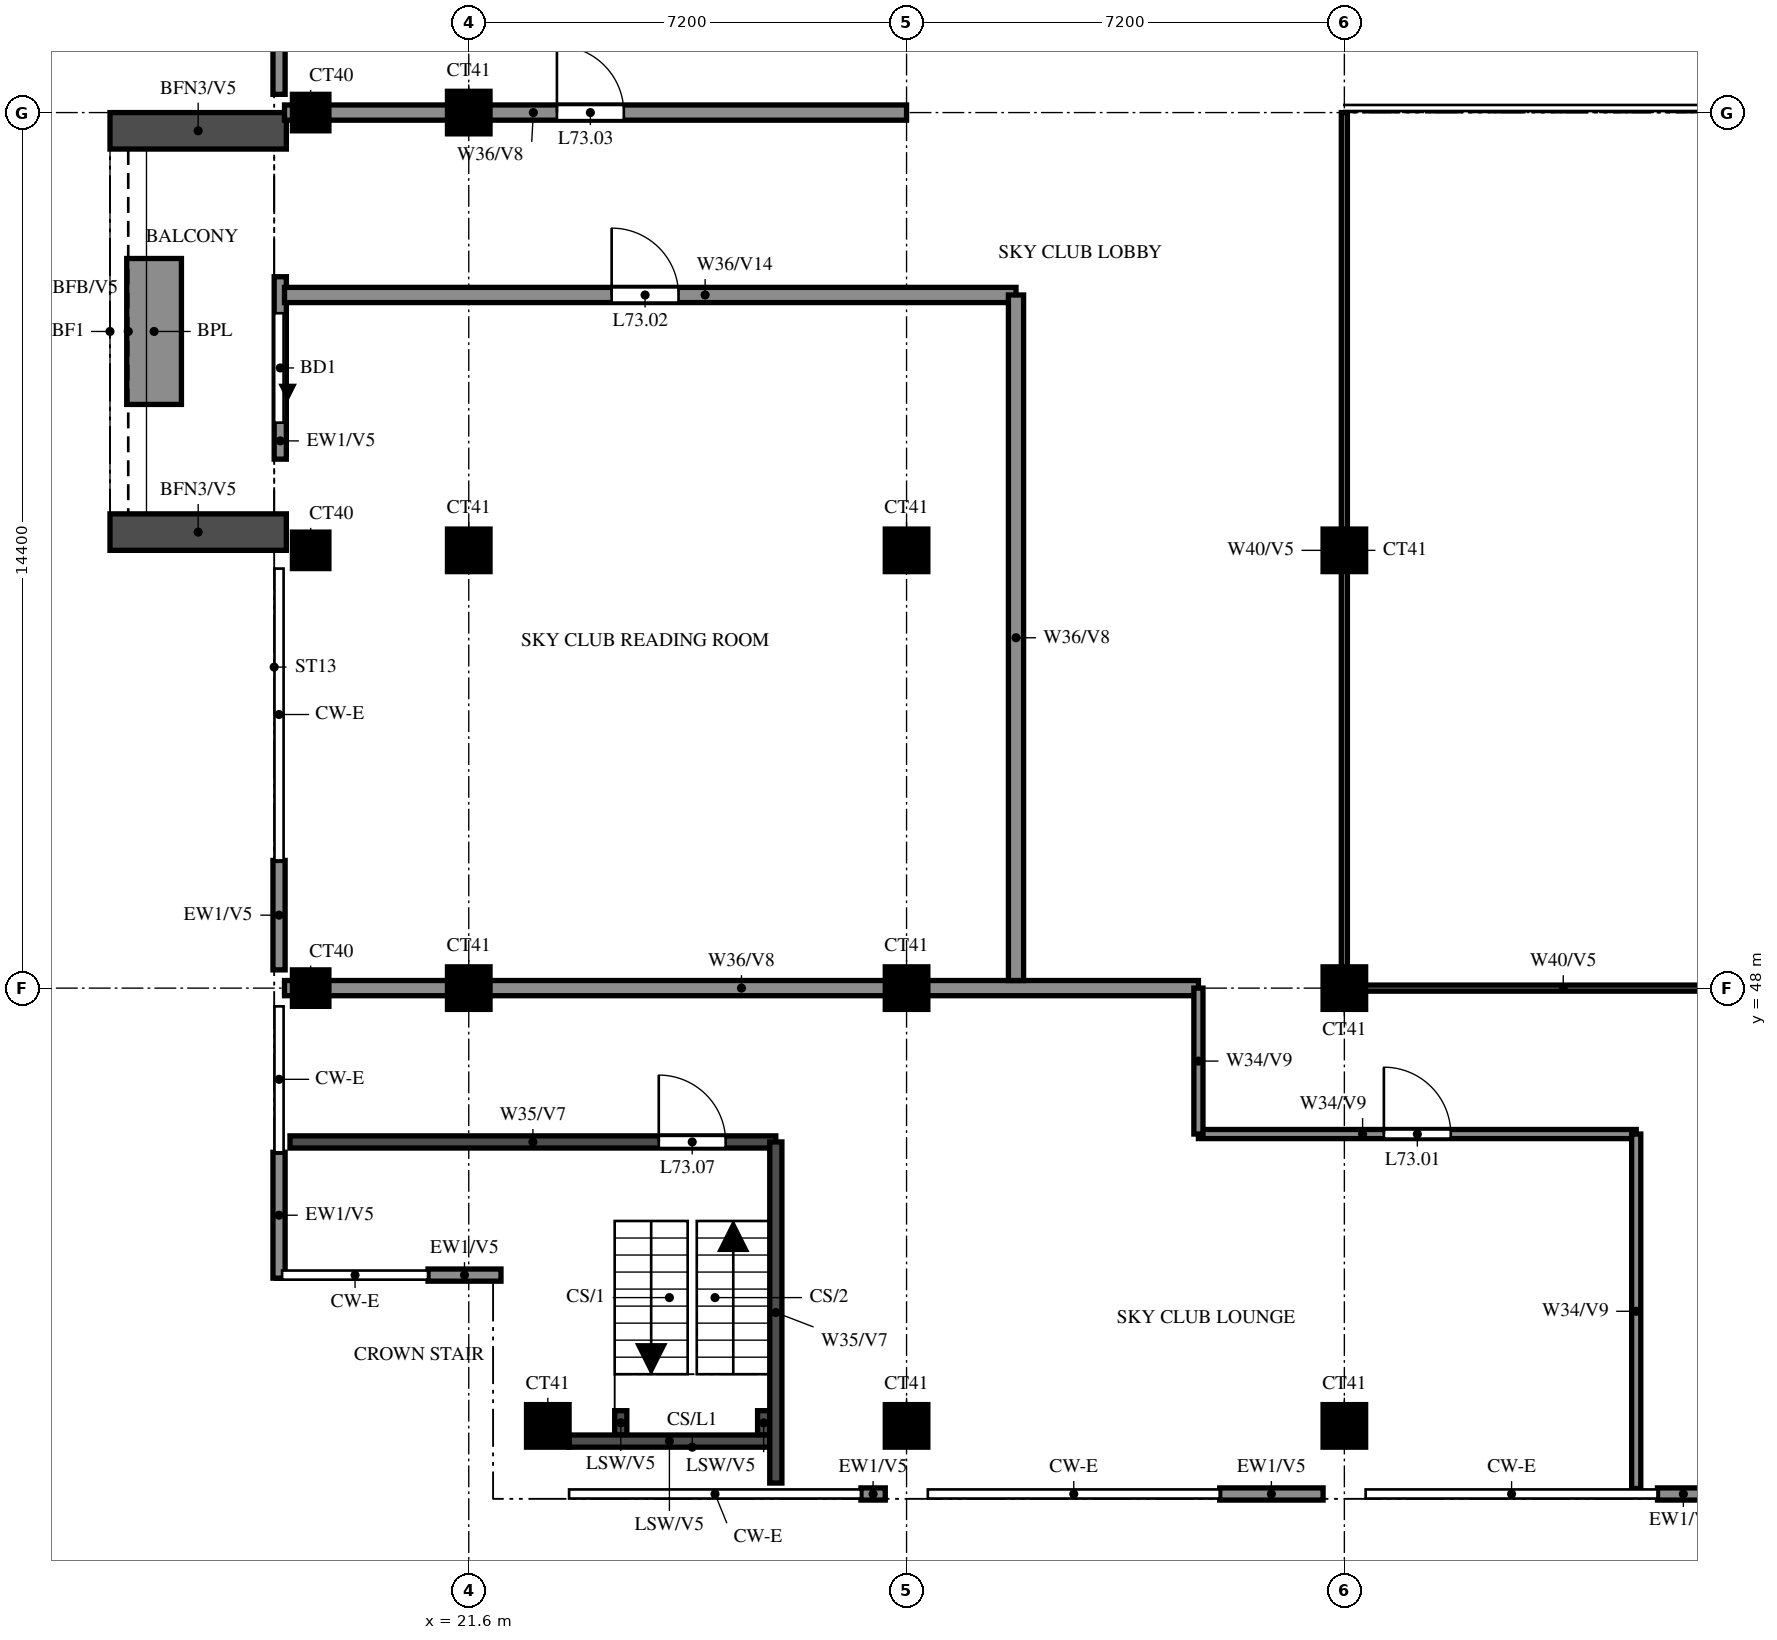
"""IFC4 building model, lengths in metres.
Left out: names, types, materials, properties, quantities, classifications, styles, units other than length and angle.
Written with IfcOpenShell. Run it as: python <this file> out.ifc"""

import sys

from ifc_helpers import new_model, si_unit, direction, frame, frame_2d, origin, origin_2d, place, context, subcontext, project, spatial, rectangle, extrude, source, transform, mapped, element, fill, save


model = new_model("IFC4")
c1 = context("Model", 3, precision=1e-05, world=origin(), true_north=direction((0.0, 1.0)))
c2 = subcontext(c1, "Body", "Model", "MODEL_VIEW")
j1 = project(units=[si_unit("LENGTHUNIT", "METRE"), si_unit("PLANEANGLEUNIT", "RADIAN")], contexts=[c1])
p1 = place(None, origin())
s1 = spatial("IfcSite", under=j1, at=p1, CompositionType="ELEMENT")
p2 = place(p1, origin())
s2 = spatial("IfcBuilding", under=s1, at=p2, CompositionType="ELEMENT")
p3 = place(p2, frame((0.0, 0.0, 271.0)))
s3 = spatial("IfcBuildingStorey", under=s2, at=p3, CompositionType="ELEMENT", Elevation=271.0)
m1 = source(origin(), c2, "Body", "SweptSolid", [
    extrude(rectangle(XDim=0.7, YDim=0.7, at=origin_2d()), origin(), (0.0, 0.0, 1.0), 3.15),
])
for number, where, z_axis, x_axis in (
    (1, (22.9, 40.8, 0.0), (0.0, 0.0, 1.0), (1.0, 0.0, 0.0)),
    (2, (28.8, 40.8, 0.0), (0.0, 0.0, 1.0), (1.0, 0.0, 0.0)),
    (3, (36.0, 40.8, 0.0), (0.0, 0.0, 1.0), (1.0, 0.0, 0.0)),
):
    element("IfcColumn", number, at=place(p3, frame(where, z_axis=z_axis, x_axis=x_axis)), inside=s3, PredefinedType="COLUMN", context=c2, shape_type="MappedRepresentation", body=[
        mapped(m1, transform((0.0, 0.0, 0.0))),
    ])
m2 = source(origin(), c2, "Body", "SweptSolid", [
    extrude(rectangle(XDim=0.6, YDim=0.6, at=origin_2d()), origin(), (0.0, 0.0, 1.0), 3.15),
])
p4 = place(p3, frame((19.0, 48.0, 0.0), z_axis=(0.0, 0.0, 1.0), x_axis=(1.0, 0.0, 0.0)))
e4 = element("IfcColumn", 4, at=p4, inside=s3, PredefinedType="COLUMN", context=c2, shape_type="MappedRepresentation", body=[
    mapped(m2, transform((0.0, 0.0, 0.0))),
])
for number, where, z_axis, x_axis in (
    (5, (21.6, 48.0, 0.0), (0.0, 0.0, 1.0), (1.0, 0.0, 0.0)),
    (6, (28.8, 48.0, 0.0), (0.0, 0.0, 1.0), (1.0, 0.0, 0.0)),
    (7, (36.0, 48.0, 0.0), (0.0, 0.0, 1.0), (1.0, 0.0, 0.0)),
):
    element("IfcColumn", number, at=place(p3, frame(where, z_axis=z_axis, x_axis=x_axis)), inside=s3, PredefinedType="COLUMN", context=c2, shape_type="MappedRepresentation", body=[
        mapped(m1, transform((0.0, 0.0, 0.0))),
    ])
p5 = place(p3, frame((19.0, 55.2, 0.0), z_axis=(0.0, 0.0, 1.0), x_axis=(1.0, 0.0, 0.0)))
e8 = element("IfcColumn", 8, at=p5, inside=s3, PredefinedType="COLUMN", context=c2, shape_type="MappedRepresentation", body=[
    mapped(m2, transform((0.0, 0.0, 0.0))),
])
for number, where, z_axis, x_axis in (
    (9, (21.6, 55.2, 0.0), (0.0, 0.0, 1.0), (1.0, 0.0, 0.0)),
    (10, (28.8, 55.2, 0.0), (0.0, 0.0, 1.0), (1.0, 0.0, 0.0)),
    (11, (36.0, 55.2, 0.0), (0.0, 0.0, 1.0), (1.0, 0.0, 0.0)),
):
    element("IfcColumn", number, at=place(p3, frame(where, z_axis=z_axis, x_axis=x_axis)), inside=s3, PredefinedType="COLUMN", context=c2, shape_type="MappedRepresentation", body=[
        mapped(m1, transform((0.0, 0.0, 0.0))),
    ])
p6 = place(p3, frame((19.0, 62.4, 0.0), z_axis=(0.0, 0.0, 1.0), x_axis=(1.0, 0.0, 0.0)))
e12 = element("IfcColumn", 12, at=p6, inside=s3, PredefinedType="COLUMN", context=c2, shape_type="MappedRepresentation", body=[
    mapped(m2, transform((0.0, 0.0, 0.0))),
])
p7 = place(p3, frame((21.6, 62.4, 0.0), z_axis=(0.0, 0.0, 1.0), x_axis=(1.0, 0.0, 0.0)))
e13 = element("IfcColumn", 13, at=p7, inside=s3, PredefinedType="COLUMN", context=c2, shape_type="MappedRepresentation", body=[
    mapped(m1, transform((0.0, 0.0, 0.0))),
])
p8 = place(p3, frame((18.5, 59.7, 0.0), z_axis=(0.0, 0.0, 1.0), x_axis=(0.0, -1.0, 0.0)))
e14 = element("IfcWall", 14, at=p8, inside=s3, PredefinedType="SOLIDWALL", context=c2, shape_type="SweptSolid", body=[
    extrude(rectangle(XDim=3.0, YDim=0.2, at=frame_2d((1.5, 0.0))), origin(), (0.0, 0.0, 1.0), 3.15),
])
p9 = place(p8, frame((0.6, 0.0, 0.0)))
e15 = element("IfcOpeningElement", 15, at=p9, cuts=e14, PredefinedType="OPENING", context=c2, shape_type="SweptSolid", body=[
    extrude(rectangle(XDim=1.8, YDim=2.4, at=frame_2d((0.9, 1.2))), frame((0.0, 0.11, 0.0), z_axis=(0.0, -1.0, 0.0), x_axis=(1.0, 0.0, 0.0)), (0.0, 0.0, 1.0), 0.22),
])
for number, where, z_axis, x_axis in (
    (16, (18.48, 64.5, 0.0), (0.0, 0.0, 1.0), (0.0, -1.0, 0.0)),
    (17, (18.48, 50.1, 0.0), (0.0, 0.0, 1.0), (0.0, -1.0, 0.0)),
):
    element("IfcWall", number, at=place(p3, frame(where, z_axis=z_axis, x_axis=x_axis)), inside=s3, PredefinedType="SOLIDWALL", context=c2, shape_type="SweptSolid", body=[
        extrude(rectangle(XDim=1.8, YDim=0.2, at=frame_2d((0.9, 0.0))), origin(), (0.0, 0.0, 1.0), 3.15),
    ])
p10 = place(p3, frame((18.48, 45.3, 0.0), z_axis=(0.0, 0.0, 1.0), x_axis=(0.0, -1.0, 0.0)))
e18 = element("IfcWall", 18, at=p10, inside=s3, PredefinedType="SOLIDWALL", context=c2, shape_type="SweptSolid", body=[
    extrude(rectangle(XDim=2.07, YDim=0.2, at=frame_2d((1.035, 0.0))), origin(), (0.0, 0.0, 1.0), 3.15),
])
p11 = place(p3, frame((20.93, 43.28, 0.0), z_axis=(0.0, 0.0, 1.0), x_axis=(1.0, 0.0, 0.0)))
e19 = element("IfcWall", 19, at=p11, inside=s3, PredefinedType="SOLIDWALL", context=c2, shape_type="SweptSolid", body=[
    extrude(rectangle(XDim=1.2, YDim=0.2, at=frame_2d((0.6, 0.0))), origin(), (0.0, 0.0, 1.0), 3.15),
])
p12 = place(p3, frame((28.05, 39.68, 0.0), z_axis=(0.0, 0.0, 1.0), x_axis=(1.0, 0.0, 0.0)))
e20 = element("IfcWall", 20, at=p12, inside=s3, PredefinedType="SOLIDWALL", context=c2, shape_type="SweptSolid", body=[
    extrude(rectangle(XDim=0.4, YDim=0.2, at=frame_2d((0.2, 0.0))), origin(), (0.0, 0.0, 1.0), 3.15),
])
p13 = place(p3, frame((33.95, 39.68, 0.0), z_axis=(0.0, 0.0, 1.0), x_axis=(1.0, 0.0, 0.0)))
e21 = element("IfcWall", 21, at=p13, inside=s3, PredefinedType="SOLIDWALL", context=c2, shape_type="SweptSolid", body=[
    extrude(rectangle(XDim=1.7, YDim=0.2, at=frame_2d((0.85, 0.0))), origin(), (0.0, 0.0, 1.0), 3.15),
])
p14 = place(p3, frame((41.15, 39.68, 0.0), z_axis=(0.0, 0.0, 1.0), x_axis=(1.0, 0.0, 0.0)))
e22 = element("IfcWall", 22, at=p14, inside=s3, PredefinedType="SOLIDWALL", context=c2, shape_type="SweptSolid", body=[
    extrude(rectangle(XDim=0.85, YDim=0.2, at=frame_2d((0.425, 0.0))), origin(), (0.0, 0.0, 1.0), 3.15),
])
for number, where, z_axis, x_axis in (
    (23, (18.6, 62.1, 0.0), (0.0, 0.0, 1.0), (-1.0, 0.0, 0.0)),
    (24, (18.6, 55.5, 0.0), (0.0, 0.0, 1.0), (-1.0, 0.0, 0.0)),
):
    element("IfcWall", number, at=place(p3, frame(where, z_axis=z_axis, x_axis=x_axis)), inside=s3, PredefinedType="SOLIDWALL", context=c2, shape_type="SweptSolid", body=[
        extrude(rectangle(XDim=2.9, YDim=0.6, at=frame_2d((1.45, 0.0))), origin(), (0.0, 0.0, 1.0), 2.901),
    ])
p15 = place(p3, frame((16.425, 60.0, 0.0), z_axis=(0.0, 0.0, 1.0), x_axis=(0.0, -1.0, 0.0)))
e25 = element("IfcWall", 25, at=p15, inside=s3, PredefinedType="SOLIDWALL", context=c2, shape_type="SweptSolid", body=[
    extrude(rectangle(XDim=2.4, YDim=0.9, at=frame_2d((1.2, 0.0))), origin(), (0.0, 0.0, 1.0), 0.9),
])
for number, where, z_axis, x_axis in (
    (26, (24.1, 40.65, 0.0), (0.0, 0.0, 1.0), (0.0, 1.0, 0.0)),
    (27, (26.45, 40.65, 0.0), (0.0, 0.0, 1.0), (0.0, 1.0, 0.0)),
):
    element("IfcWall", number, at=place(p3, frame(where, z_axis=z_axis, x_axis=x_axis)), inside=s3, PredefinedType="SOLIDWALL", context=c2, shape_type="SweptSolid", body=[
        extrude(rectangle(XDim=0.4, YDim=0.2, at=frame_2d((0.2, 0.0))), origin(), (0.0, 0.0, 1.0), 1.55),
    ])
p16 = place(p3, frame((23.25, 40.55, 0.0), z_axis=(0.0, 0.0, 1.0), x_axis=(1.0, 0.0, 0.0)))
e28 = element("IfcWall", 28, at=p16, inside=s3, PredefinedType="SOLIDWALL", context=c2, shape_type="SweptSolid", body=[
    extrude(rectangle(XDim=3.3, YDim=0.2, at=frame_2d((1.65, 0.0))), origin(), (0.0, 0.0, 1.0), 1.55),
])
p17 = place(p3, frame((18.66, 45.47, 0.0), z_axis=(0.0, 0.0, 1.0), x_axis=(1.0, 0.0, 0.0)))
e29 = element("IfcWall", 29, at=p17, inside=s3, PredefinedType="SOLIDWALL", context=c2, shape_type="SweptSolid", body=[
    extrude(rectangle(XDim=7.99, YDim=0.2, at=frame_2d((3.995, 0.0))), origin(), (0.0, 0.0, 1.0), 3.15),
])
p18 = place(p17, frame((6.065, 0.0, 0.0)))
e30 = element("IfcOpeningElement", 30, at=p18, cuts=e29, PredefinedType="OPENING", context=c2, shape_type="SweptSolid", body=[
    extrude(rectangle(XDim=1.1, YDim=2.1, at=frame_2d((0.55, 1.05))), frame((0.0, 0.11, 0.0), z_axis=(0.0, -1.0, 0.0), x_axis=(1.0, 0.0, 0.0)), (0.0, 0.0, 1.0), 0.22),
])
p19 = place(p3, frame((33.6, 45.6, 0.0), z_axis=(0.0, 0.0, 1.0), x_axis=(1.0, 0.0, 0.0)))
e31 = element("IfcWall", 31, at=p19, inside=s3, PredefinedType="PARTITIONING", context=c2, shape_type="SweptSolid", body=[
    extrude(rectangle(XDim=7.2, YDim=0.15, at=frame_2d((3.6, 0.0))), origin(), (0.0, 0.0, 1.0), 3.15),
])
p20 = place(p19, frame((3.05, 0.0, 0.0)))
e32 = element("IfcOpeningElement", 32, at=p20, cuts=e31, PredefinedType="OPENING", context=c2, shape_type="SweptSolid", body=[
    extrude(rectangle(XDim=1.1, YDim=2.1, at=frame_2d((0.55, 1.05))), frame((0.0, 0.085, 0.0), z_axis=(0.0, -1.0, 0.0), x_axis=(1.0, 0.0, 0.0)), (0.0, 0.0, 1.0), 0.17),
])
p21 = place(p3, frame((36.0, 48.0, 0.0), z_axis=(0.0, 0.0, 1.0), x_axis=(1.0, 0.0, 0.0)))
e33 = element("IfcWall", 33, at=p21, inside=s3, PredefinedType="PARTITIONING", context=c2, shape_type="SweptSolid", body=[
    extrude(rectangle(XDim=7.2, YDim=0.1, at=frame_2d((3.6, 0.0))), origin(), (0.0, 0.0, 1.0), 2.25),
])
p22 = place(p3, frame((18.57, 48.0, 0.0), z_axis=(0.0, 0.0, 1.0), x_axis=(1.0, 0.0, 0.0)))
e34 = element("IfcWall", 34, at=p22, inside=s3, PredefinedType="SOLIDWALL", context=c2, shape_type="SweptSolid", body=[
    extrude(rectangle(XDim=15.03, YDim=0.25, at=frame_2d((7.515, 0.0))), origin(), (0.0, 0.0, 1.0), 3.15),
])
p23 = place(p3, frame((18.57, 59.4, 0.0), z_axis=(0.0, 0.0, 1.0), x_axis=(1.0, 0.0, 0.0)))
e35 = element("IfcWall", 35, at=p23, inside=s3, PredefinedType="SOLIDWALL", context=c2, shape_type="SweptSolid", body=[
    extrude(rectangle(XDim=12.03, YDim=0.25, at=frame_2d((6.015, 0.0))), origin(), (0.0, 0.0, 1.0), 2.25),
])
p24 = place(p23, frame((5.38, 0.0, 0.0)))
e36 = element("IfcOpeningElement", 36, at=p24, cuts=e35, PredefinedType="OPENING", context=c2, shape_type="SweptSolid", body=[
    extrude(rectangle(XDim=1.1, YDim=2.1, at=frame_2d((0.55, 1.05))), frame((0.0, 0.135, 0.0), z_axis=(0.0, -1.0, 0.0), x_axis=(1.0, 0.0, 0.0)), (0.0, 0.0, 1.0), 0.27),
])
p25 = place(p3, frame((18.57, 62.4, 0.0), z_axis=(0.0, 0.0, 1.0), x_axis=(1.0, 0.0, 0.0)))
e37 = element("IfcWall", 37, at=p25, inside=s3, PredefinedType="SOLIDWALL", context=c2, shape_type="SweptSolid", body=[
    extrude(rectangle(XDim=10.23, YDim=0.25, at=frame_2d((5.115, 0.0))), origin(), (0.0, 0.0, 1.0), 3.15),
])
p26 = place(p25, frame((4.48, 0.0, 0.0)))
e38 = element("IfcOpeningElement", 38, at=p26, cuts=e37, PredefinedType="OPENING", context=c2, shape_type="SweptSolid", body=[
    extrude(rectangle(XDim=1.1, YDim=2.1, at=frame_2d((0.55, 1.05))), frame((0.0, 0.135, 0.0), z_axis=(0.0, -1.0, 0.0), x_axis=(1.0, 0.0, 0.0)), (0.0, 0.0, 1.0), 0.27),
])
p27 = place(p3, frame((26.65, 39.86, 0.0), z_axis=(0.0, 0.0, 1.0), x_axis=(0.0, 1.0, 0.0)))
e39 = element("IfcWall", 39, at=p27, inside=s3, PredefinedType="SOLIDWALL", context=c2, shape_type="SweptSolid", body=[
    extrude(rectangle(XDim=5.61, YDim=0.2, at=frame_2d((2.805, 0.0))), origin(), (0.0, 0.0, 1.0), 3.15),
])
p28 = place(p3, frame((30.6, 48.125, 0.0), z_axis=(0.0, 0.0, 1.0), x_axis=(0.0, 1.0, 0.0)))
e40 = element("IfcWall", 40, at=p28, inside=s3, PredefinedType="SOLIDWALL", context=c2, shape_type="SweptSolid", body=[
    extrude(rectangle(XDim=11.275, YDim=0.25, at=frame_2d((5.637, 0.0))), origin(), (0.0, 0.0, 1.0), 3.15),
])
p29 = place(p3, frame((33.6, 45.6, 0.0), z_axis=(0.0, 0.0, 1.0), x_axis=(0.0, 1.0, 0.0)))
e41 = element("IfcWall", 41, at=p29, inside=s3, PredefinedType="PARTITIONING", context=c2, shape_type="SweptSolid", body=[
    extrude(rectangle(XDim=2.4, YDim=0.15, at=frame_2d((1.2, 0.0))), origin(), (0.0, 0.0, 1.0), 3.15),
])
p30 = place(p3, frame((36.0, 48.0, 0.0), z_axis=(0.0, 0.0, 1.0), x_axis=(0.0, 1.0, 0.0)))
e42 = element("IfcWall", 42, at=p30, inside=s3, PredefinedType="PARTITIONING", context=c2, shape_type="SweptSolid", body=[
    extrude(rectangle(XDim=14.4, YDim=0.1, at=frame_2d((7.2, 0.0))), origin(), (0.0, 0.0, 1.0), 2.25),
])
p31 = place(p3, frame((40.8, 39.77, 0.0), z_axis=(0.0, 0.0, 1.0), x_axis=(0.0, 1.0, 0.0)))
e43 = element("IfcWall", 43, at=p31, inside=s3, PredefinedType="PARTITIONING", context=c2, shape_type="SweptSolid", body=[
    extrude(rectangle(XDim=5.83, YDim=0.15, at=frame_2d((2.915, 0.0))), origin(), (0.0, 0.0, 1.0), 3.15),
])
p32 = place(p9, origin())
e44 = element("IfcDoor", 44, at=p32, inside=s3, OperationType="DOUBLE_DOOR_SLIDING", PredefinedType="DOOR", context=c2, shape_type="SweptSolid", body=[
    extrude(rectangle(XDim=1.8, YDim=2.4, at=frame_2d((0.9, 1.2))), frame((0.0, 0.025, 0.0), z_axis=(0.0, -1.0, 0.0), x_axis=(1.0, 0.0, 0.0)), (0.0, 0.0, 1.0), 0.05),
])
fill(e15, e44)
p33 = place(p20, origin())
e45 = element("IfcDoor", 45, at=p33, inside=s3, OperationType="SINGLE_SWING_RIGHT", PredefinedType="DOOR", context=c2, shape_type="SweptSolid", body=[
    extrude(rectangle(XDim=1.1, YDim=2.1, at=frame_2d((0.55, 1.05))), frame((0.0, 0.025, 0.0), z_axis=(0.0, -1.0, 0.0), x_axis=(1.0, 0.0, 0.0)), (0.0, 0.0, 1.0), 0.05),
])
fill(e32, e45)
p34 = place(p24, origin())
e46 = element("IfcDoor", 46, at=p34, inside=s3, OperationType="SINGLE_SWING_LEFT", PredefinedType="DOOR", context=c2, shape_type="SweptSolid", body=[
    extrude(rectangle(XDim=1.1, YDim=2.1, at=frame_2d((0.55, 1.05))), frame((0.0, 0.025, 0.0), z_axis=(0.0, -1.0, 0.0), x_axis=(1.0, 0.0, 0.0)), (0.0, 0.0, 1.0), 0.05),
])
fill(e36, e46)
p35 = place(p26, origin())
e47 = element("IfcDoor", 47, at=p35, inside=s3, OperationType="SINGLE_SWING_LEFT", PredefinedType="DOOR", context=c2, shape_type="SweptSolid", body=[
    extrude(rectangle(XDim=1.1, YDim=2.1, at=frame_2d((0.55, 1.05))), frame((0.0, 0.025, 0.0), z_axis=(0.0, -1.0, 0.0), x_axis=(1.0, 0.0, 0.0)), (0.0, 0.0, 1.0), 0.05),
])
fill(e38, e47)
p36 = place(p18, origin())
e48 = element("IfcDoor", 48, at=p36, inside=s3, OperationType="SINGLE_SWING_RIGHT", PredefinedType="DOOR", context=c2, shape_type="SweptSolid", body=[
    extrude(rectangle(XDim=1.1, YDim=2.1, at=frame_2d((0.55, 1.05))), frame((0.0, 0.025, 0.0), z_axis=(0.0, -1.0, 0.0), x_axis=(1.0, 0.0, 0.0)), (0.0, 0.0, 1.0), 0.05),
])
fill(e30, e48)
save(model, sys.argv[1])
